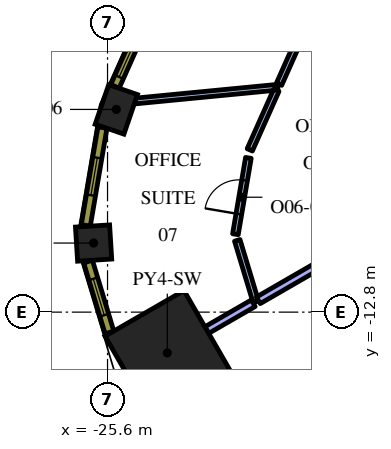
"""IFC4 building model, lengths in metres.
Left out: names, types, materials, properties, quantities, classifications, styles, units other than length and angle.
Written with IfcOpenShell. Run it as: python <this file> out.ifc"""

import sys

from ifc_helpers import new_model, si_unit, direction, frame, frame_2d, origin, origin_2d, place, context, subcontext, project, spatial, rectangle, extrude, element, fill, save


model = new_model("IFC4")
c1 = context("Model", 3, precision=1e-05, world=origin(), true_north=direction((0.0, 1.0)))
c2 = subcontext(c1, "Body", "Model", "MODEL_VIEW")
j1 = project(units=[si_unit("LENGTHUNIT", "METRE"), si_unit("PLANEANGLEUNIT", "RADIAN")], contexts=[c1])
p1 = place(None, origin())
s1 = spatial("IfcSite", under=j1, at=p1, CompositionType="ELEMENT")
p2 = place(p1, origin())
s2 = spatial("IfcBuilding", under=s1, at=p2, CompositionType="ELEMENT")
p3 = place(p2, frame((0.0, 0.0, 201.6)))
s3 = spatial("IfcBuildingStorey", under=s2, at=p3, CompositionType="ELEMENT", Elevation=201.6)
p4 = place(p3, frame((-24.027, -13.872, 0.0), z_axis=(0.0, 0.0, 1.0), x_axis=(-0.866025403784, -0.5, 0.0)))
e1 = element("IfcColumn", 1, at=p4, inside=s3, PredefinedType="COLUMN", context=c2, shape_type="SweptSolid", body=[
    extrude(rectangle(XDim=2.4, YDim=2.4, at=origin_2d()), origin(), (0.0, 0.0, 1.0), 4.2),
])
p5 = place(p3, frame((-25.369, -7.466, 0.0), z_axis=(0.0, 0.0, 1.0), x_axis=(-0.324074280638, -0.946031638281, 0.0)))
e2 = element("IfcColumn", 2, at=p5, inside=s3, PredefinedType="COLUMN", context=c2, shape_type="SweptSolid", body=[
    extrude(rectangle(XDim=1.1, YDim=0.8, at=origin_2d()), origin(), (0.0, 0.0, 1.0), 4.2),
])
p6 = place(p3, frame((-25.967, -10.982, 0.0), z_axis=(0.0, 0.0, 1.0), x_axis=(0.062217428964, -0.998062619044, 0.0)))
e3 = element("IfcColumn", 3, at=p6, inside=s3, PredefinedType="COLUMN", context=c2, shape_type="SweptSolid", body=[
    extrude(rectangle(XDim=0.9, YDim=0.9, at=origin_2d()), origin(), (0.0, 0.0, 1.0), 4.2),
])
p7 = place(p3, frame((-21.122, -6.882, 0.0), z_axis=(0.0, 0.0, 1.0), x_axis=(-0.995354824533, -0.096274468471, 0.0)))
e4 = element("IfcWall", 4, at=p7, inside=s3, PredefinedType="PARTITIONING", context=c2, shape_type="SweptSolid", body=[
    extrude(rectangle(XDim=3.766, YDim=0.15, at=frame_2d((1.883, 0.0))), origin(), (0.0, 0.0, 1.0), 3.45),
])
p8 = place(p3, frame((-21.087, -6.803, 0.0), z_axis=(0.0, 0.0, 1.0), x_axis=(0.40757725445, 0.913170729741, 0.0)))
e5 = element("IfcWall", 5, at=p8, inside=s3, PredefinedType="PARTITIONING", context=c2, shape_type="SweptSolid", body=[
    extrude(rectangle(XDim=3.557, YDim=0.15, at=frame_2d((1.778, 0.0))), origin(), (0.0, 0.0, 1.0), 3.45),
])
p9 = place(p8, frame((1.357, 0.0, 0.0)))
e6 = element("IfcOpeningElement", 6, at=p9, cuts=e5, PredefinedType="OPENING", context=c2, shape_type="SweptSolid", body=[
    extrude(rectangle(XDim=0.9, YDim=2.1, at=frame_2d((0.45, 1.05))), frame((0.0, 0.085, 0.0), z_axis=(0.0, -1.0, 0.0), x_axis=(1.0, 0.0, 0.0)), (0.0, 0.0, 1.0), 0.17),
])
p10 = place(p3, frame((-21.157, -6.961, 0.0), z_axis=(0.0, 0.0, 1.0), x_axis=(-0.407627569492, -0.913148270869, 0.0)))
e7 = element("IfcWall", 7, at=p10, inside=s3, PredefinedType="PARTITIONING", context=c2, shape_type="SweptSolid", body=[
    extrude(rectangle(XDim=1.718, YDim=0.15, at=frame_2d((0.859, 0.0))), origin(), (0.0, 0.0, 1.0), 3.45),
])
p11 = place(p3, frame((-22.235, -10.75, 0.0), z_axis=(0.0, 0.0, 1.0), x_axis=(0.167623442148, 0.985851095066, 0.0)))
e8 = element("IfcWall", 8, at=p11, inside=s3, PredefinedType="PARTITIONING", context=c2, shape_type="SweptSolid", body=[
    extrude(rectangle(XDim=2.038, YDim=0.15, at=frame_2d((1.019, 0.0))), origin(), (0.0, 0.0, 1.0), 3.45),
])
p12 = place(p11, frame((0.538, 0.0, 0.0)))
e9 = element("IfcOpeningElement", 9, at=p12, cuts=e8, PredefinedType="OPENING", context=c2, shape_type="SweptSolid", body=[
    extrude(rectangle(XDim=0.9, YDim=2.1, at=frame_2d((0.45, 1.05))), frame((0.0, 0.085, 0.0), z_axis=(0.0, -1.0, 0.0), x_axis=(1.0, 0.0, 0.0)), (0.0, 0.0, 1.0), 0.17),
])
p13 = place(p3, frame((-22.186, -10.911, 0.0), z_axis=(0.0, 0.0, 1.0), x_axis=(0.288899576463, -0.957359407286, 0.0)))
e10 = element("IfcWall", 10, at=p13, inside=s3, PredefinedType="PARTITIONING", context=c2, shape_type="SweptSolid", body=[
    extrude(rectangle(XDim=1.688, YDim=0.15, at=frame_2d((0.844, 0.0))), origin(), (0.0, 0.0, 1.0), 3.45),
])
p14 = place(p3, frame((-21.765, -12.566, 0.0), z_axis=(0.0, 0.0, 1.0), x_axis=(-0.866021473228, -0.500006807861, 0.0)))
e11 = element("IfcWall", 11, at=p14, inside=s3, PredefinedType="PARTITIONING", context=c2, shape_type="SweptSolid", body=[
    extrude(rectangle(XDim=1.412, YDim=0.2, at=frame_2d((0.706, 0.0))), origin(), (0.0, 0.0, 1.0), 3.45),
])
p15 = place(p3, frame((-16.021, -9.25, 0.0), z_axis=(0.0, 0.0, 1.0), x_axis=(-0.86601739438, -0.500013872438, 0.0)))
e12 = element("IfcWall", 12, at=p15, inside=s3, PredefinedType="PARTITIONING", context=c2, shape_type="SweptSolid", body=[
    extrude(rectangle(XDim=6.478, YDim=0.2, at=frame_2d((3.239, 0.0))), origin(), (0.0, 0.0, 1.0), 3.45),
])
p16 = place(p3, frame((-23.24, -2.011, 0.0), z_axis=(0.0, 0.0, 1.0), x_axis=(-0.407579651789, -0.913169659728, 0.0)))
e13 = element("IfcWall", 13, at=p16, inside=s3, PredefinedType="SOLIDWALL", context=c2, shape_type="SweptSolid", body=[
    extrude(rectangle(XDim=5.311, YDim=0.24, at=frame_2d((2.655, 0.0))), origin(), (0.0, 0.0, 1.0), 3.95),
])
p17 = place(p16, frame((0.306, 0.0, 0.9)))
e14 = element("IfcOpeningElement", 14, at=p17, cuts=e13, PredefinedType="OPENING", context=c2, shape_type="SweptSolid", body=[
    extrude(rectangle(XDim=1.5, YDim=2.55, at=frame_2d((0.75, 1.275))), frame((0.0, 0.13, 0.0), z_axis=(0.0, -1.0, 0.0), x_axis=(1.0, 0.0, 0.0)), (0.0, 0.0, 1.0), 0.26),
])
p18 = place(p16, frame((3.539, 0.0, 0.9)))
e15 = element("IfcOpeningElement", 15, at=p18, cuts=e13, PredefinedType="OPENING", context=c2, shape_type="SweptSolid", body=[
    extrude(rectangle(XDim=1.5, YDim=2.55, at=frame_2d((0.75, 1.275))), frame((0.0, 0.13, 0.0), z_axis=(0.0, -1.0, 0.0), x_axis=(1.0, 0.0, 0.0)), (0.0, 0.0, 1.0), 0.26),
])
p19 = place(p3, frame((-25.734, -7.945, 0.0), z_axis=(0.0, 0.0, 1.0), x_axis=(-0.167660055546, -0.985844869021, 0.0)))
e16 = element("IfcWall", 16, at=p19, inside=s3, PredefinedType="SOLIDWALL", context=c2, shape_type="SweptSolid", body=[
    extrude(rectangle(XDim=2.609, YDim=0.24, at=frame_2d((1.305, 0.0))), origin(), (0.0, 0.0, 1.0), 3.95),
])
p20 = place(p19, frame((0.805, 0.0, 0.9)))
e17 = element("IfcOpeningElement", 17, at=p20, cuts=e16, PredefinedType="OPENING", context=c2, shape_type="SweptSolid", body=[
    extrude(rectangle(XDim=1.0, YDim=2.55, at=frame_2d((0.5, 1.275))), frame((0.0, 0.13, 0.0), z_axis=(0.0, -1.0, 0.0), x_axis=(1.0, 0.0, 0.0)), (0.0, 0.0, 1.0), 0.26),
])
p21 = place(p3, frame((-26.112, -11.469, 0.0), z_axis=(0.0, 0.0, 1.0), x_axis=(0.288727209095, -0.957411405159, 0.0)))
e18 = element("IfcWall", 18, at=p21, inside=s3, PredefinedType="SOLIDWALL", context=c2, shape_type="SweptSolid", body=[
    extrude(rectangle(XDim=1.948, YDim=0.24, at=frame_2d((0.974, 0.0))), origin(), (0.0, 0.0, 1.0), 3.95),
])
p22 = place(p21, frame((0.474, 0.0, 0.9)))
e19 = element("IfcOpeningElement", 19, at=p22, cuts=e18, PredefinedType="OPENING", context=c2, shape_type="SweptSolid", body=[
    extrude(rectangle(XDim=1.0, YDim=2.55, at=frame_2d((0.5, 1.275))), frame((0.0, 0.13, 0.0), z_axis=(0.0, -1.0, 0.0), x_axis=(1.0, 0.0, 0.0)), (0.0, 0.0, 1.0), 0.26),
])
p23 = place(p12, origin())
e20 = element("IfcDoor", 20, at=p23, inside=s3, OperationType="SINGLE_SWING_LEFT", PredefinedType="DOOR", context=c2, shape_type="SweptSolid", body=[
    extrude(rectangle(XDim=0.9, YDim=2.1, at=frame_2d((0.45, 1.05))), frame((0.0, 0.025, 0.0), z_axis=(0.0, -1.0, 0.0), x_axis=(1.0, 0.0, 0.0)), (0.0, 0.0, 1.0), 0.05),
])
fill(e9, e20)
p24 = place(p18, origin())
e21 = element("IfcWindow", 21, at=p24, inside=s3, PartitioningType="SINGLE_PANEL", PredefinedType="WINDOW", context=c2, shape_type="SweptSolid", body=[
    extrude(rectangle(XDim=1.5, YDim=2.55, at=frame_2d((0.75, 1.275))), frame((0.0, 0.04, 0.0), z_axis=(0.0, -1.0, 0.0), x_axis=(1.0, 0.0, 0.0)), (0.0, 0.0, 1.0), 0.06),
])
fill(e15, e21)
p25 = place(p20, origin())
e22 = element("IfcWindow", 22, at=p25, inside=s3, PartitioningType="SINGLE_PANEL", PredefinedType="WINDOW", context=c2, shape_type="SweptSolid", body=[
    extrude(rectangle(XDim=1.0, YDim=2.55, at=frame_2d((0.5, 1.275))), frame((0.0, 0.04, 0.0), z_axis=(0.0, -1.0, 0.0), x_axis=(1.0, 0.0, 0.0)), (0.0, 0.0, 1.0), 0.06),
])
fill(e17, e22)
p26 = place(p22, origin())
e23 = element("IfcWindow", 23, at=p26, inside=s3, PartitioningType="SINGLE_PANEL", PredefinedType="WINDOW", context=c2, shape_type="SweptSolid", body=[
    extrude(rectangle(XDim=1.0, YDim=2.55, at=frame_2d((0.5, 1.275))), frame((0.0, 0.04, 0.0), z_axis=(0.0, -1.0, 0.0), x_axis=(1.0, 0.0, 0.0)), (0.0, 0.0, 1.0), 0.06),
])
fill(e19, e23)
save(model, sys.argv[1])
